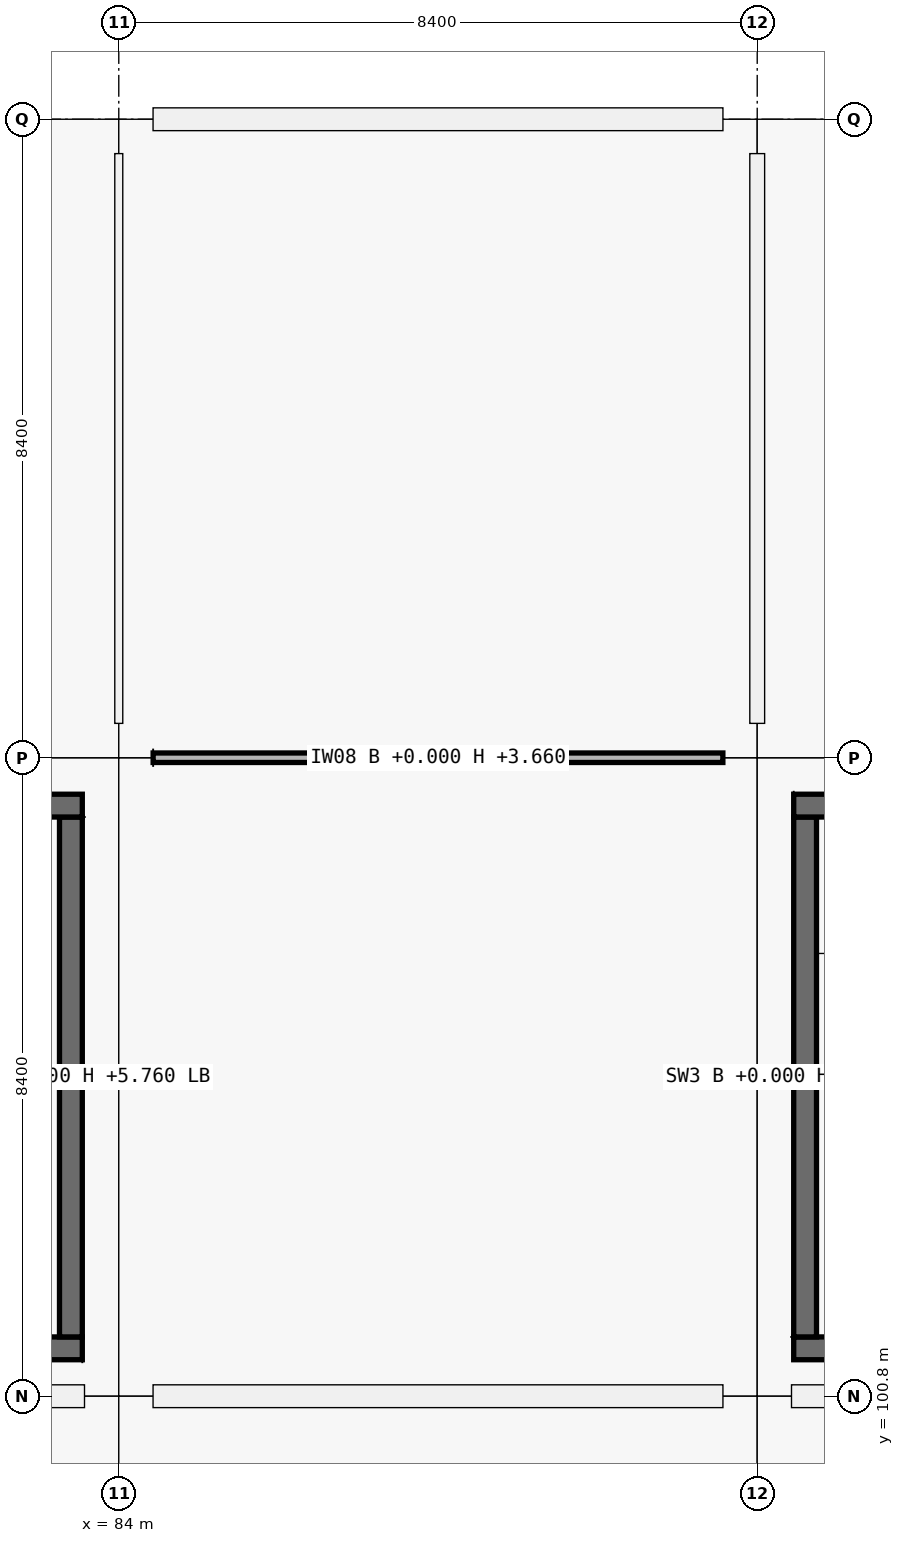
"""IFC4 building model, lengths in metres.
Left out: names, types, materials, properties, quantities, classifications, styles, units other than length and angle.
Written with IfcOpenShell. Run it as: python <this file> out.ifc"""

import sys

from ifc_helpers import new_model, si_unit, direction, frame, frame_2d, origin, origin_2d, place, context, subcontext, project, spatial, rectangle, extrude, element, fill, save


model = new_model("IFC4")
c1 = context("Model", 3, precision=1e-05, world=origin(), true_north=direction((0.0, 1.0)))
c2 = subcontext(c1, "Body", "Model", "MODEL_VIEW")
j1 = project(units=[si_unit("LENGTHUNIT", "METRE"), si_unit("PLANEANGLEUNIT", "RADIAN")], contexts=[c1])
p1 = place(None, origin())
s1 = spatial("IfcSite", under=j1, at=p1, CompositionType="ELEMENT")
p2 = place(p1, origin())
s2 = spatial("IfcBuilding", under=s1, at=p2, CompositionType="ELEMENT")
p3 = place(p2, origin())
s3 = spatial("IfcBuildingStorey", under=s2, at=p3, CompositionType="ELEMENT", Elevation=0.0)
for number, where, z_axis, x_axis in (
    (1, (84.0, 100.8, 0.0), (0.0, 0.0, 1.0), (1.0, 0.0, 0.0)),
    (2, (84.0, 109.2, 0.0), (0.0, 0.0, 1.0), (1.0, 0.0, 0.0)),
    (3, (84.0, 117.6, 0.0), (0.0, 0.0, 1.0), (1.0, 0.0, 0.0)),
    (4, (92.4, 100.8, 0.0), (0.0, 0.0, 1.0), (1.0, 0.0, 0.0)),
    (5, (92.4, 109.2, 0.0), (0.0, 0.0, 1.0), (1.0, 0.0, 0.0)),
    (6, (92.4, 117.6, 0.0), (0.0, 0.0, 1.0), (1.0, 0.0, 0.0)),
):
    element("IfcColumn", number, at=place(p3, frame(where, z_axis=z_axis, x_axis=x_axis)), inside=s3, PredefinedType="COLUMN", context=c2, shape_type="SweptSolid", body=[
        extrude(rectangle(XDim=0.9, YDim=0.9, at=origin_2d()), origin(), (0.0, 0.0, 1.0), 5.76),
    ])
p4 = place(p3, frame((83.549, 100.8, 0.0), z_axis=(0.0, 0.0, 1.0), x_axis=(-1.0, 0.0, 0.0)))
e7 = element("IfcWall", 7, at=p4, inside=s3, PredefinedType="SOLIDWALL", context=c2, shape_type="SweptSolid", body=[
    extrude(rectangle(XDim=7.498, YDim=0.3, at=frame_2d((3.749, 0.0))), origin(), (0.0, 0.0, 1.0), 4.7),
])
p5 = place(p3, frame((91.949, 100.8, 0.0), z_axis=(0.0, 0.0, 1.0), x_axis=(-1.0, 0.0, 0.0)))
e8 = element("IfcWall", 8, at=p5, inside=s3, PredefinedType="SOLIDWALL", context=c2, shape_type="SweptSolid", body=[
    extrude(rectangle(XDim=7.498, YDim=0.3, at=frame_2d((3.749, 0.0))), origin(), (0.0, 0.0, 1.0), 4.7),
])
p6 = place(p5, frame((2.899, 0.0, 0.9)))
e9 = element("IfcOpeningElement", 9, at=p6, cuts=e8, PredefinedType="OPENING", context=c2, shape_type="SweptSolid", body=[
    extrude(rectangle(XDim=1.7, YDim=1.85, at=frame_2d((0.85, 0.925))), frame((0.0, 0.15, 0.0), z_axis=(0.0, -1.0, 0.0), x_axis=(1.0, 0.0, 0.0)), (0.0, 0.0, 1.0), 0.3),
])
p7 = place(p3, frame((84.451, 117.6, 0.0), z_axis=(0.0, 0.0, 1.0), x_axis=(1.0, 0.0, 0.0)))
e10 = element("IfcWall", 10, at=p7, inside=s3, PredefinedType="SOLIDWALL", context=c2, shape_type="SweptSolid", body=[
    extrude(rectangle(XDim=7.498, YDim=0.3, at=frame_2d((3.749, 0.0))), origin(), (0.0, 0.0, 1.0), 4.7),
])
p8 = place(p7, frame((2.599, 0.0, 0.0)))
e11 = element("IfcOpeningElement", 11, at=p8, cuts=e10, PredefinedType="OPENING", context=c2, shape_type="SweptSolid", body=[
    extrude(rectangle(XDim=2.3, YDim=2.3, at=frame_2d((1.15, 1.15))), frame((0.0, 0.15, 0.0), z_axis=(0.0, -1.0, 0.0), x_axis=(1.0, 0.0, 0.0)), (0.0, 0.0, 1.0), 0.3),
])
p9 = place(p3, frame((100.349, 100.8, 0.0), z_axis=(0.0, 0.0, 1.0), x_axis=(-1.0, 0.0, 0.0)))
e12 = element("IfcWall", 12, at=p9, inside=s3, PredefinedType="SOLIDWALL", context=c2, shape_type="SweptSolid", body=[
    extrude(rectangle(XDim=7.498, YDim=0.3, at=frame_2d((3.749, 0.0))), origin(), (0.0, 0.0, 1.0), 4.7),
])
for number, where, z_axis, x_axis in (
    (13, (83.52, 101.43, 0.0), (0.0, 0.0, 1.0), (-1.0, 0.0, 0.0)),
    (14, (76.08, 108.57, 0.0), (0.0, 0.0, 1.0), (1.0, 0.0, 0.0)),
):
    element("IfcWall", number, at=place(p3, frame(where, z_axis=z_axis, x_axis=x_axis)), inside=s3, PredefinedType="SHEAR", context=c2, shape_type="SweptSolid", body=[
        extrude(rectangle(XDim=7.44, YDim=0.3, at=frame_2d((3.72, 0.0))), origin(), (0.0, 0.0, 1.0), 5.76),
    ])
p10 = place(p3, frame((83.37, 108.42, 0.0), z_axis=(0.0, 0.0, 1.0), x_axis=(0.0, -1.0, 0.0)))
e15 = element("IfcWall", 15, at=p10, inside=s3, PredefinedType="SHEAR", context=c2, shape_type="SweptSolid", body=[
    extrude(rectangle(XDim=6.84, YDim=0.3, at=frame_2d((3.42, 0.0))), origin(), (0.0, 0.0, 1.0), 5.76),
])
p11 = place(p10, frame((3.97, 0.0, 0.0)))
e16 = element("IfcOpeningElement", 16, at=p11, cuts=e15, PredefinedType="OPENING", context=c2, shape_type="SweptSolid", body=[
    extrude(rectangle(XDim=1.5, YDim=2.15, at=frame_2d((0.75, 1.075))), frame((0.0, 0.15, 0.0), z_axis=(0.0, -1.0, 0.0), x_axis=(1.0, 0.0, 0.0)), (0.0, 0.0, 1.0), 0.3),
])
p12 = place(p3, frame((100.32, 101.43, 0.0), z_axis=(0.0, 0.0, 1.0), x_axis=(-1.0, 0.0, 0.0)))
e17 = element("IfcWall", 17, at=p12, inside=s3, PredefinedType="SHEAR", context=c2, shape_type="SweptSolid", body=[
    extrude(rectangle(XDim=7.44, YDim=0.3, at=frame_2d((3.72, 0.0))), origin(), (0.0, 0.0, 1.0), 5.76),
])
p13 = place(p3, frame((93.03, 101.58, 0.0), z_axis=(0.0, 0.0, 1.0), x_axis=(0.0, 1.0, 0.0)))
e18 = element("IfcWall", 18, at=p13, inside=s3, PredefinedType="SHEAR", context=c2, shape_type="SweptSolid", body=[
    extrude(rectangle(XDim=6.84, YDim=0.3, at=frame_2d((3.42, 0.0))), origin(), (0.0, 0.0, 1.0), 5.76),
])
p14 = place(p3, frame((92.88, 108.57, 0.0), z_axis=(0.0, 0.0, 1.0), x_axis=(1.0, 0.0, 0.0)))
e19 = element("IfcWall", 19, at=p14, inside=s3, PredefinedType="SHEAR", context=c2, shape_type="SweptSolid", body=[
    extrude(rectangle(XDim=7.44, YDim=0.3, at=frame_2d((3.72, 0.0))), origin(), (0.0, 0.0, 1.0), 5.76),
])
p15 = place(p3, frame((84.452, 109.2, 0.0), z_axis=(0.0, 0.0, 1.0), x_axis=(1.0, 0.0, 0.0)))
e20 = element("IfcWall", 20, at=p15, inside=s3, PredefinedType="PARTITIONING", context=c2, shape_type="SweptSolid", body=[
    extrude(rectangle(XDim=7.496, YDim=0.125, at=frame_2d((3.748, 0.0))), origin(), (0.0, 0.0, 1.0), 3.66),
])
p16 = place(p15, frame((3.218, 0.0, 0.0)))
e21 = element("IfcOpeningElement", 21, at=p16, cuts=e20, PredefinedType="OPENING", context=c2, shape_type="SweptSolid", body=[
    extrude(rectangle(XDim=1.06, YDim=2.25, at=frame_2d((0.53, 1.125))), frame((0.0, 0.062, 0.0), z_axis=(0.0, -1.0, 0.0), x_axis=(1.0, 0.0, 0.0)), (0.0, 0.0, 1.0), 0.125),
])
p17 = place(p3, frame((84.0, 109.652, 0.0), z_axis=(0.0, 0.0, 1.0), x_axis=(0.0, 1.0, 0.0)))
e22 = element("IfcWall", 22, at=p17, inside=s3, PredefinedType="PARTITIONING", context=c2, shape_type="SweptSolid", body=[
    extrude(rectangle(XDim=7.496, YDim=0.105, at=frame_2d((3.748, 0.0))), origin(), (0.0, 0.0, 1.0), 3.66),
])
p18 = place(p17, frame((3.288, 0.0, 0.0)))
e23 = element("IfcOpeningElement", 23, at=p18, cuts=e22, PredefinedType="OPENING", context=c2, shape_type="SweptSolid", body=[
    extrude(rectangle(XDim=0.92, YDim=2.15, at=frame_2d((0.46, 1.075))), frame((0.0, 0.052, 0.0), z_axis=(0.0, -1.0, 0.0), x_axis=(1.0, 0.0, 0.0)), (0.0, 0.0, 1.0), 0.105),
])
p19 = place(p3, frame((92.4, 109.652, 0.0), z_axis=(0.0, 0.0, 1.0), x_axis=(0.0, 1.0, 0.0)))
e24 = element("IfcWall", 24, at=p19, inside=s3, PredefinedType="PARTITIONING", context=c2, shape_type="SweptSolid", body=[
    extrude(rectangle(XDim=7.496, YDim=0.195, at=frame_2d((3.748, 0.0))), origin(), (0.0, 0.0, 1.0), 3.66),
])
p20 = place(p19, frame((3.223, 0.0, 0.0)))
e25 = element("IfcOpeningElement", 25, at=p20, cuts=e24, PredefinedType="OPENING", context=c2, shape_type="SweptSolid", body=[
    extrude(rectangle(XDim=1.05, YDim=2.12, at=frame_2d((0.525, 1.06))), frame((0.0, 0.098, 0.0), z_axis=(0.0, -1.0, 0.0), x_axis=(1.0, 0.0, 0.0)), (0.0, 0.0, 1.0), 0.195),
])
p21 = place(p6, origin())
e26 = element("IfcWindow", 26, at=p21, inside=s3, PartitioningType="SINGLE_PANEL", PredefinedType="WINDOW", context=c2, shape_type="SweptSolid", body=[
    extrude(rectangle(XDim=1.7, YDim=1.85, at=frame_2d((0.85, 0.925))), frame((0.0, 0.03, 0.0), z_axis=(0.0, -1.0, 0.0), x_axis=(1.0, 0.0, 0.0)), (0.0, 0.0, 1.0), 0.06),
])
fill(e9, e26)
p22 = place(p8, origin())
e27 = element("IfcDoor", 27, at=p22, inside=s3, OperationType="DOUBLE_DOOR_SINGLE_SWING", PredefinedType="DOOR", context=c2, shape_type="SweptSolid", body=[
    extrude(rectangle(XDim=2.3, YDim=2.3, at=frame_2d((1.15, 1.15))), frame((0.0, 0.025, 0.0), z_axis=(0.0, -1.0, 0.0), x_axis=(1.0, 0.0, 0.0)), (0.0, 0.0, 1.0), 0.05),
])
fill(e11, e27)
p23 = place(p11, origin())
e28 = element("IfcDoor", 28, at=p23, inside=s3, OperationType="DOUBLE_DOOR_SINGLE_SWING", PredefinedType="DOOR", context=c2, shape_type="SweptSolid", body=[
    extrude(rectangle(XDim=1.5, YDim=2.15, at=frame_2d((0.75, 1.075))), frame((0.0, 0.025, 0.0), z_axis=(0.0, -1.0, 0.0), x_axis=(1.0, 0.0, 0.0)), (0.0, 0.0, 1.0), 0.05),
])
fill(e16, e28)
p24 = place(p16, origin())
e29 = element("IfcDoor", 29, at=p24, inside=s3, OperationType="SINGLE_SWING_LEFT", PredefinedType="DOOR", context=c2, shape_type="SweptSolid", body=[
    extrude(rectangle(XDim=1.06, YDim=2.25, at=frame_2d((0.53, 1.125))), frame((0.0, 0.025, 0.0), z_axis=(0.0, -1.0, 0.0), x_axis=(1.0, 0.0, 0.0)), (0.0, 0.0, 1.0), 0.05),
])
fill(e21, e29)
p25 = place(p18, origin())
e30 = element("IfcDoor", 30, at=p25, inside=s3, OperationType="SINGLE_SWING_LEFT", PredefinedType="DOOR", context=c2, shape_type="SweptSolid", body=[
    extrude(rectangle(XDim=0.92, YDim=2.15, at=frame_2d((0.46, 1.075))), frame((0.0, 0.025, 0.0), z_axis=(0.0, -1.0, 0.0), x_axis=(1.0, 0.0, 0.0)), (0.0, 0.0, 1.0), 0.05),
])
fill(e23, e30)
p26 = place(p20, origin())
e31 = element("IfcDoor", 31, at=p26, inside=s3, OperationType="SINGLE_SWING_RIGHT", PredefinedType="DOOR", context=c2, shape_type="SweptSolid", body=[
    extrude(rectangle(XDim=1.05, YDim=2.12, at=frame_2d((0.525, 1.06))), frame((0.0, 0.025, 0.0), z_axis=(0.0, -1.0, 0.0), x_axis=(1.0, 0.0, 0.0)), (0.0, 0.0, 1.0), 0.05),
])
fill(e25, e31)
save(model, sys.argv[1])
